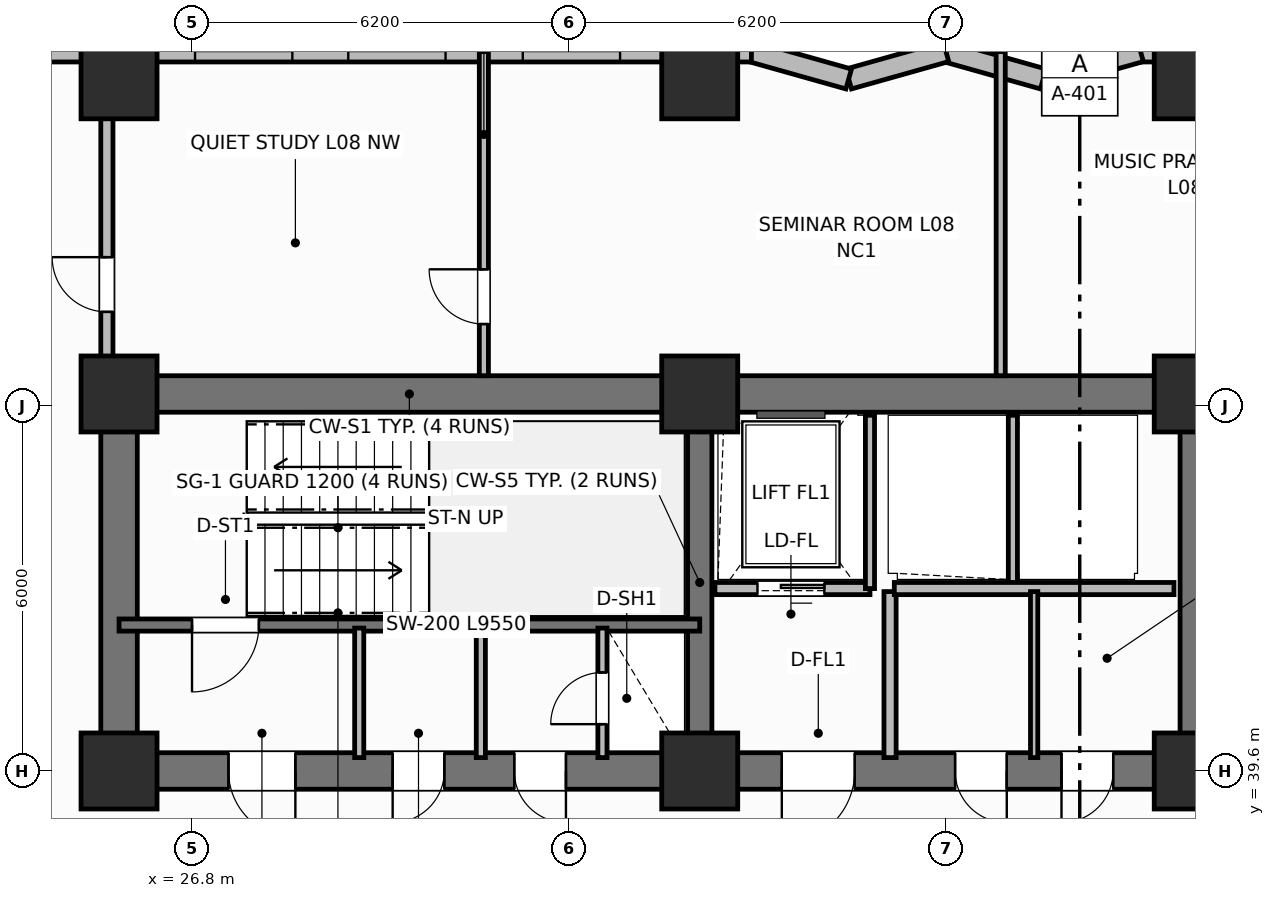
"""IFC4 building model, lengths in metres.
Left out: names, types, materials, properties, quantities, classifications, styles, units other than length and angle.
Written with IfcOpenShell. Run it as: python <this file> out.ifc"""

import sys

from ifc_helpers import new_model, si_unit, direction, frame, frame_2d, origin, origin_2d, place, context, subcontext, project, spatial, rectangle, extrude, element, fill, save


model = new_model("IFC4")
c1 = context("Model", 3, precision=1e-05, world=origin(), true_north=direction((0.0, 1.0)))
c2 = subcontext(c1, "Body", "Model", "MODEL_VIEW")
j1 = project(units=[si_unit("LENGTHUNIT", "METRE"), si_unit("PLANEANGLEUNIT", "RADIAN")], contexts=[c1])
p1 = place(None, origin())
s1 = spatial("IfcSite", under=j1, at=p1, CompositionType="ELEMENT")
p2 = place(p1, origin())
s2 = spatial("IfcBuilding", under=s1, at=p2, CompositionType="ELEMENT")
p3 = place(p2, frame((0.0, 0.0, 36.2)))
s3 = spatial("IfcBuildingStorey", under=s2, at=p3, CompositionType="ELEMENT", Elevation=36.2)
p4 = place(p3, frame((25.6, 45.8, 0.0), z_axis=(0.0, 0.0, 1.0), x_axis=(1.0, 0.0, 0.0)))
e1 = element("IfcWall", 1, at=p4, inside=s3, PredefinedType="SHEAR", context=c2, shape_type="SweptSolid", body=[
    extrude(rectangle(XDim=27.2, YDim=0.6, at=frame_2d((13.6, 0.0))), origin(), (0.0, 0.0, 1.0), 3.7),
])
p5 = place(p3, frame((25.6, 39.9, 0.0), z_axis=(0.0, 0.0, 1.0), x_axis=(0.0, 1.0, 0.0)))
e2 = element("IfcWall", 2, at=p5, inside=s3, PredefinedType="SHEAR", context=c2, shape_type="SweptSolid", body=[
    extrude(rectangle(XDim=5.6, YDim=0.6, at=frame_2d((2.8, 0.0))), origin(), (0.0, 0.0, 1.0), 3.7),
])
p6 = place(p3, frame((52.8, 39.6, 0.0), z_axis=(0.0, 0.0, 1.0), x_axis=(-1.0, 0.0, 0.0)))
e3 = element("IfcWall", 3, at=p6, inside=s3, PredefinedType="SHEAR", context=c2, shape_type="SweptSolid", body=[
    extrude(rectangle(XDim=27.2, YDim=0.6, at=frame_2d((13.6, 0.0))), origin(), (0.0, 0.0, 1.0), 3.7),
])
p7 = place(p6, frame((24.3, 0.0, 0.0)))
e4 = element("IfcOpeningElement", 4, at=p7, cuts=e3, PredefinedType="OPENING", context=c2, shape_type="SweptSolid", body=[
    extrude(rectangle(XDim=1.1, YDim=2.15, at=frame_2d((0.55, 1.075))), frame((0.0, 0.31, 0.0), z_axis=(0.0, -1.0, 0.0), x_axis=(1.0, 0.0, 0.0)), (0.0, 0.0, 1.0), 0.62),
])
p8 = place(p6, frame((21.85, 0.0, 0.0)))
e5 = element("IfcOpeningElement", 5, at=p8, cuts=e3, PredefinedType="OPENING", context=c2, shape_type="SweptSolid", body=[
    extrude(rectangle(XDim=0.85, YDim=2.1, at=frame_2d((0.425, 1.05))), frame((0.0, 0.31, 0.0), z_axis=(0.0, -1.0, 0.0), x_axis=(1.0, 0.0, 0.0)), (0.0, 0.0, 1.0), 0.62),
])
p9 = place(p6, frame((19.85, 0.0, 0.0)))
e6 = element("IfcOpeningElement", 6, at=p9, cuts=e3, PredefinedType="OPENING", context=c2, shape_type="SweptSolid", body=[
    extrude(rectangle(XDim=0.85, YDim=2.1, at=frame_2d((0.425, 1.05))), frame((0.0, 0.31, 0.0), z_axis=(0.0, -1.0, 0.0), x_axis=(1.0, 0.0, 0.0)), (0.0, 0.0, 1.0), 0.62),
])
p10 = place(p6, frame((15.1, 0.0, 0.0)))
e7 = element("IfcOpeningElement", 7, at=p10, cuts=e3, PredefinedType="OPENING", context=c2, shape_type="SweptSolid", body=[
    extrude(rectangle(XDim=1.2, YDim=2.15, at=frame_2d((0.6, 1.075))), frame((0.0, 0.31, 0.0), z_axis=(0.0, -1.0, 0.0), x_axis=(1.0, 0.0, 0.0)), (0.0, 0.0, 1.0), 0.62),
])
p11 = place(p6, frame((12.6, 0.0, 0.0)))
e8 = element("IfcOpeningElement", 8, at=p11, cuts=e3, PredefinedType="OPENING", context=c2, shape_type="SweptSolid", body=[
    extrude(rectangle(XDim=0.85, YDim=2.1, at=frame_2d((0.425, 1.05))), frame((0.0, 0.31, 0.0), z_axis=(0.0, -1.0, 0.0), x_axis=(1.0, 0.0, 0.0)), (0.0, 0.0, 1.0), 0.62),
])
p12 = place(p6, frame((10.85, 0.0, 0.0)))
e9 = element("IfcOpeningElement", 9, at=p12, cuts=e3, PredefinedType="OPENING", context=c2, shape_type="SweptSolid", body=[
    extrude(rectangle(XDim=0.85, YDim=2.1, at=frame_2d((0.425, 1.05))), frame((0.0, 0.31, 0.0), z_axis=(0.0, -1.0, 0.0), x_axis=(1.0, 0.0, 0.0)), (0.0, 0.0, 1.0), 0.62),
])
p13 = place(p6, frame((6.85, 0.0, 0.0)))
e10 = element("IfcOpeningElement", 10, at=p13, cuts=e3, PredefinedType="OPENING", context=c2, shape_type="SweptSolid", body=[
    extrude(rectangle(XDim=0.85, YDim=2.1, at=frame_2d((0.425, 1.05))), frame((0.0, 0.31, 0.0), z_axis=(0.0, -1.0, 0.0), x_axis=(1.0, 0.0, 0.0)), (0.0, 0.0, 1.0), 0.62),
])
p14 = place(p6, frame((2.0, 0.0, 0.0)))
e11 = element("IfcOpeningElement", 11, at=p14, cuts=e3, PredefinedType="OPENING", context=c2, shape_type="SweptSolid", body=[
    extrude(rectangle(XDim=0.85, YDim=2.1, at=frame_2d((0.425, 1.05))), frame((0.0, 0.31, 0.0), z_axis=(0.0, -1.0, 0.0), x_axis=(1.0, 0.0, 0.0)), (0.0, 0.0, 1.0), 0.62),
])
for number, where, z_axis, x_axis in (
    (12, (35.15, 39.9, 0.0), (0.0, 0.0, 1.0), (0.0, 1.0, 0.0)),
    (13, (43.25, 39.9, 0.0), (0.0, 0.0, 1.0), (0.0, 1.0, 0.0)),
):
    element("IfcWall", number, at=place(p3, frame(where, z_axis=z_axis, x_axis=x_axis)), inside=s3, PredefinedType="SHEAR", context=c2, shape_type="SweptSolid", body=[
        extrude(rectangle(XDim=5.6, YDim=0.4, at=frame_2d((2.8, 0.0))), origin(), (0.0, 0.0, 1.0), 3.7),
    ])
for number, where, z_axis, x_axis in (
    (14, (25.6, 39.6, 0.0), (0.0, 0.0, 1.0), (1.0, 0.0, 0.0)),
    (15, (25.6, 45.8, 0.0), (0.0, 0.0, 1.0), (1.0, 0.0, 0.0)),
    (16, (35.15, 39.6, 0.0), (0.0, 0.0, 1.0), (1.0, 0.0, 0.0)),
    (17, (35.15, 45.8, 0.0), (0.0, 0.0, 1.0), (1.0, 0.0, 0.0)),
    (18, (43.25, 39.6, 0.0), (0.0, 0.0, 1.0), (1.0, 0.0, 0.0)),
    (19, (43.25, 45.8, 0.0), (0.0, 0.0, 1.0), (1.0, 0.0, 0.0)),
    (20, (25.6, 50.95, 0.0), (0.0, 0.0, 1.0), (1.0, 0.0, 0.0)),
    (21, (35.15, 50.95, 0.0), (0.0, 0.0, 1.0), (1.0, 0.0, 0.0)),
    (22, (43.25, 50.95, 0.0), (0.0, 0.0, 1.0), (1.0, 0.0, 0.0)),
):
    element("IfcColumn", number, at=place(p3, frame(where, z_axis=z_axis, x_axis=x_axis)), inside=s3, PredefinedType="COLUMN", context=c2, shape_type="SweptSolid", body=[
        extrude(rectangle(XDim=1.25, YDim=1.25, at=origin_2d()), origin(), (0.0, 0.0, 1.0), 3.7),
    ])
p15 = place(p3, frame((59.8, 51.43, 0.0), z_axis=(0.0, 0.0, 1.0), x_axis=(-1.0, 0.0, 0.0)))
e23 = element("IfcWall", 23, at=p15, inside=s3, PredefinedType="SOLIDWALL", context=c2, shape_type="SweptSolid", body=[
    extrude(rectangle(XDim=17.4, YDim=0.34, at=frame_2d((8.7, 0.0))), origin(), (0.0, 0.0, 1.0), 2.7),
])
p16 = place(p15, frame((1.863, 0.0, 0.68)))
e24 = element("IfcOpeningElement", 24, at=p16, cuts=e23, PredefinedType="OPENING", context=c2, shape_type="SweptSolid", body=[
    extrude(rectangle(XDim=1.6, YDim=1.9, at=frame_2d((0.8, 0.95))), frame((0.0, 0.18, 0.0), z_axis=(0.0, -1.0, 0.0), x_axis=(1.0, 0.0, 0.0)), (0.0, 0.0, 1.0), 0.36),
])
p17 = place(p15, frame((9.913, 0.0, 0.68)))
e25 = element("IfcOpeningElement", 25, at=p17, cuts=e23, PredefinedType="OPENING", context=c2, shape_type="SweptSolid", body=[
    extrude(rectangle(XDim=1.6, YDim=1.9, at=frame_2d((0.8, 0.95))), frame((0.0, 0.18, 0.0), z_axis=(0.0, -1.0, 0.0), x_axis=(1.0, 0.0, 0.0)), (0.0, 0.0, 1.0), 0.36),
])
p18 = place(p15, frame((13.587, 0.0, 0.68)))
e26 = element("IfcOpeningElement", 26, at=p18, cuts=e23, PredefinedType="OPENING", context=c2, shape_type="SweptSolid", body=[
    extrude(rectangle(XDim=1.6, YDim=1.9, at=frame_2d((0.8, 0.95))), frame((0.0, 0.18, 0.0), z_axis=(0.0, -1.0, 0.0), x_axis=(1.0, 0.0, 0.0)), (0.0, 0.0, 1.0), 0.36),
])
p19 = place(p3, frame((42.4, 51.43, 0.0), z_axis=(0.0, 0.0, 1.0), x_axis=(-0.962652136636, -0.270741322725, 0.0)))
e27 = element("IfcWall", 27, at=p19, inside=s3, PredefinedType="SOLIDWALL", context=c2, shape_type="SweptSolid", body=[
    extrude(rectangle(XDim=1.662, YDim=0.34, at=frame_2d((0.831, 0.0))), origin(), (0.0, 0.0, 1.0), 2.7),
])
p20 = place(p3, frame((40.8, 50.98, 0.0), z_axis=(0.0, 0.0, 1.0), x_axis=(-0.962662902433, 0.270703040766, 0.0)))
e28 = element("IfcWall", 28, at=p20, inside=s3, PredefinedType="SOLIDWALL", context=c2, shape_type="SweptSolid", body=[
    extrude(rectangle(XDim=1.662, YDim=0.34, at=frame_2d((0.831, 0.0))), origin(), (0.0, 0.0, 1.0), 2.7),
])
p21 = place(p3, frame((39.2, 51.43, 0.0), z_axis=(0.0, 0.0, 1.0), x_axis=(-0.962652136636, -0.270741322725, 0.0)))
e29 = element("IfcWall", 29, at=p21, inside=s3, PredefinedType="SOLIDWALL", context=c2, shape_type="SweptSolid", body=[
    extrude(rectangle(XDim=1.662, YDim=0.34, at=frame_2d((0.831, 0.0))), origin(), (0.0, 0.0, 1.0), 2.7),
])
p22 = place(p3, frame((37.6, 50.98, 0.0), z_axis=(0.0, 0.0, 1.0), x_axis=(-0.962662902433, 0.270703040766, 0.0)))
e30 = element("IfcWall", 30, at=p22, inside=s3, PredefinedType="SOLIDWALL", context=c2, shape_type="SweptSolid", body=[
    extrude(rectangle(XDim=1.662, YDim=0.34, at=frame_2d((0.831, 0.0))), origin(), (0.0, 0.0, 1.0), 2.7),
])
p23 = place(p3, frame((36.0, 51.43, 0.0), z_axis=(0.0, 0.0, 1.0), x_axis=(-1.0, 0.0, 0.0)))
e31 = element("IfcWall", 31, at=p23, inside=s3, PredefinedType="SOLIDWALL", context=c2, shape_type="SweptSolid", body=[
    extrude(rectangle(XDim=17.4, YDim=0.34, at=frame_2d((8.7, 0.0))), origin(), (0.0, 0.0, 1.0), 2.7),
])
p24 = place(p23, frame((2.16, 0.0, 0.68)))
e32 = element("IfcOpeningElement", 32, at=p24, cuts=e31, PredefinedType="OPENING", context=c2, shape_type="SweptSolid", body=[
    extrude(rectangle(XDim=1.6, YDim=1.9, at=frame_2d((0.8, 0.95))), frame((0.0, 0.18, 0.0), z_axis=(0.0, -1.0, 0.0), x_axis=(1.0, 0.0, 0.0)), (0.0, 0.0, 1.0), 0.36),
])
p25 = place(p23, frame((5.03, 0.0, 0.68)))
e33 = element("IfcOpeningElement", 33, at=p25, cuts=e31, PredefinedType="OPENING", context=c2, shape_type="SweptSolid", body=[
    extrude(rectangle(XDim=1.6, YDim=1.9, at=frame_2d((0.8, 0.95))), frame((0.0, 0.18, 0.0), z_axis=(0.0, -1.0, 0.0), x_axis=(1.0, 0.0, 0.0)), (0.0, 0.0, 1.0), 0.36),
])
p26 = place(p23, frame((7.55, 0.0, 0.68)))
e34 = element("IfcOpeningElement", 34, at=p26, cuts=e31, PredefinedType="OPENING", context=c2, shape_type="SweptSolid", body=[
    extrude(rectangle(XDim=1.6, YDim=1.9, at=frame_2d((0.8, 0.95))), frame((0.0, 0.18, 0.0), z_axis=(0.0, -1.0, 0.0), x_axis=(1.0, 0.0, 0.0)), (0.0, 0.0, 1.0), 0.36),
])
p27 = place(p23, frame((14.34, 0.0, 0.68)))
e35 = element("IfcOpeningElement", 35, at=p27, cuts=e31, PredefinedType="OPENING", context=c2, shape_type="SweptSolid", body=[
    extrude(rectangle(XDim=1.6, YDim=1.9, at=frame_2d((0.8, 0.95))), frame((0.0, 0.18, 0.0), z_axis=(0.0, -1.0, 0.0), x_axis=(1.0, 0.0, 0.0)), (0.0, 0.0, 1.0), 0.36),
])
p28 = place(p3, frame((35.15, 42.0, 0.0), z_axis=(0.0, 0.0, 1.0), x_axis=(-1.0, 0.0, 0.0)))
e36 = element("IfcWall", 36, at=p28, inside=s3, PredefinedType="SHEAR", context=c2, shape_type="SweptSolid", body=[
    extrude(rectangle(XDim=9.55, YDim=0.2, at=frame_2d((4.775, 0.0))), origin(), (0.0, 0.0, 1.0), 3.7),
])
p29 = place(p28, frame((7.25, 0.0, 0.0)))
e37 = element("IfcOpeningElement", 37, at=p29, cuts=e36, PredefinedType="OPENING", context=c2, shape_type="SweptSolid", body=[
    extrude(rectangle(XDim=1.1, YDim=2.15, at=frame_2d((0.55, 1.075))), frame((0.0, 0.11, 0.0), z_axis=(0.0, -1.0, 0.0), x_axis=(1.0, 0.0, 0.0)), (0.0, 0.0, 1.0), 0.22),
])
p30 = place(p3, frame((33.55, 39.82, 0.0), z_axis=(0.0, 0.0, 1.0), x_axis=(0.0, 1.0, 0.0)))
e38 = element("IfcWall", 38, at=p30, inside=s3, PredefinedType="PARTITIONING", context=c2, shape_type="SweptSolid", body=[
    extrude(rectangle(XDim=2.13, YDim=0.15, at=frame_2d((1.065, 0.0))), origin(), (0.0, 0.0, 1.0), 2.53),
])
p31 = place(p30, frame((0.55, 0.0, 0.0)))
e39 = element("IfcOpeningElement", 39, at=p31, cuts=e38, PredefinedType="OPENING", context=c2, shape_type="SweptSolid", body=[
    extrude(rectangle(XDim=0.85, YDim=2.05, at=frame_2d((0.425, 1.025))), frame((0.0, 0.085, 0.0), z_axis=(0.0, -1.0, 0.0), x_axis=(1.0, 0.0, 0.0)), (0.0, 0.0, 1.0), 0.17),
])
for number, where, z_axis, x_axis in (
    (40, (29.55, 39.82, 0.0), (0.0, 0.0, 1.0), (0.0, 1.0, 0.0)),
    (41, (31.55, 39.82, 0.0), (0.0, 0.0, 1.0), (0.0, 1.0, 0.0)),
):
    element("IfcWall", number, at=place(p3, frame(where, z_axis=z_axis, x_axis=x_axis)), inside=s3, PredefinedType="PARTITIONING", context=c2, shape_type="SweptSolid", body=[
        extrude(rectangle(XDim=2.13, YDim=0.15, at=frame_2d((1.065, 0.0))), origin(), (0.0, 0.0, 1.0), 2.53),
    ])
p32 = place(p3, frame((37.95, 42.6, 0.0), z_axis=(0.0, 0.0, 1.0), x_axis=(-1.0, 0.0, 0.0)))
e42 = element("IfcWall", 42, at=p32, inside=s3, PredefinedType="PARTITIONING", context=c2, shape_type="SweptSolid", body=[
    extrude(rectangle(XDim=2.55, YDim=0.2, at=frame_2d((1.275, 0.0))), origin(), (0.0, 0.0, 1.0), 2.3),
])
p33 = place(p32, frame((0.75, 0.0, 0.0)))
e43 = element("IfcOpeningElement", 43, at=p33, cuts=e42, PredefinedType="OPENING", context=c2, shape_type="SweptSolid", body=[
    extrude(rectangle(XDim=1.1, YDim=2.15, at=frame_2d((0.55, 1.075))), frame((0.0, 0.11, 0.0), z_axis=(0.0, -1.0, 0.0), x_axis=(1.0, 0.0, 0.0)), (0.0, 0.0, 1.0), 0.22),
])
p34 = place(p3, frame((37.95, 42.6, 0.0), z_axis=(0.0, 0.0, 1.0), x_axis=(0.0, 1.0, 0.0)))
e44 = element("IfcWall", 44, at=p34, inside=s3, PredefinedType="PARTITIONING", context=c2, shape_type="SweptSolid", body=[
    extrude(rectangle(XDim=2.85, YDim=0.15, at=frame_2d((1.425, 0.0))), origin(), (0.0, 0.0, 1.0), 2.53),
])
p35 = place(p3, frame((38.28, 39.82, 0.0), z_axis=(0.0, 0.0, 1.0), x_axis=(0.0, 1.0, 0.0)))
e45 = element("IfcWall", 45, at=p35, inside=s3, PredefinedType="PARTITIONING", context=c2, shape_type="SweptSolid", body=[
    extrude(rectangle(XDim=2.73, YDim=0.2, at=frame_2d((1.365, 0.0))), origin(), (0.0, 0.0, 1.0), 2.53),
])
p36 = place(p3, frame((40.3, 42.65, 0.0), z_axis=(0.0, 0.0, 1.0), x_axis=(0.0, 1.0, 0.0)))
e46 = element("IfcWall", 46, at=p36, inside=s3, PredefinedType="PARTITIONING", context=c2, shape_type="SweptSolid", body=[
    extrude(rectangle(XDim=2.8, YDim=0.15, at=frame_2d((1.4, 0.0))), origin(), (0.0, 0.0, 1.0), 2.53),
])
p37 = place(p3, frame((42.95, 42.6, 0.0), z_axis=(0.0, 0.0, 1.0), x_axis=(-1.0, 0.0, 0.0)))
e47 = element("IfcWall", 47, at=p37, inside=s3, PredefinedType="PARTITIONING", context=c2, shape_type="SweptSolid", body=[
    extrude(rectangle(XDim=4.6, YDim=0.2, at=frame_2d((2.3, 0.0))), origin(), (0.0, 0.0, 1.0), 2.3),
])
p38 = place(p3, frame((40.65, 39.82, 0.0), z_axis=(0.0, 0.0, 1.0), x_axis=(0.0, 1.0, 0.0)))
e48 = element("IfcWall", 48, at=p38, inside=s3, PredefinedType="PARTITIONING", context=c2, shape_type="SweptSolid", body=[
    extrude(rectangle(XDim=2.73, YDim=0.12, at=frame_2d((1.365, 0.0))), origin(), (0.0, 0.0, 1.0), 2.53),
])
p39 = place(p3, frame((31.6, 46.1, 0.0), z_axis=(0.0, 0.0, 1.0), x_axis=(0.0, 1.0, 0.0)))
e49 = element("IfcWall", 49, at=p39, inside=s3, PredefinedType="PARTITIONING", context=c2, shape_type="SweptSolid", body=[
    extrude(rectangle(XDim=5.33, YDim=0.15, at=frame_2d((2.665, 0.0))), origin(), (0.0, 0.0, 1.0), 2.53),
])
p40 = place(p39, frame((0.85, 0.0, 0.0)))
e50 = element("IfcOpeningElement", 50, at=p40, cuts=e49, PredefinedType="OPENING", context=c2, shape_type="SweptSolid", body=[
    extrude(rectangle(XDim=0.9, YDim=2.1, at=frame_2d((0.45, 1.05))), frame((0.0, 0.085, 0.0), z_axis=(0.0, -1.0, 0.0), x_axis=(1.0, 0.0, 0.0)), (0.0, 0.0, 1.0), 0.17),
])
p41 = place(p3, frame((40.1, 46.1, 0.0), z_axis=(0.0, 0.0, 1.0), x_axis=(0.0, 1.0, 0.0)))
e51 = element("IfcWall", 51, at=p41, inside=s3, PredefinedType="PARTITIONING", context=c2, shape_type="SweptSolid", body=[
    extrude(rectangle(XDim=5.33, YDim=0.15, at=frame_2d((2.665, 0.0))), origin(), (0.0, 0.0, 1.0), 2.53),
])
p42 = place(p3, frame((25.4, 46.1, 0.0), z_axis=(0.0, 0.0, 1.0), x_axis=(0.0, 1.0, 0.0)))
e52 = element("IfcWall", 52, at=p42, inside=s3, PredefinedType="PARTITIONING", context=c2, shape_type="SweptSolid", body=[
    extrude(rectangle(XDim=4.38, YDim=0.2, at=frame_2d((2.19, 0.0))), origin(), (0.0, 0.0, 1.0), 2.53),
])
p43 = place(p42, frame((1.05, 0.0, 0.0)))
e53 = element("IfcOpeningElement", 53, at=p43, cuts=e52, PredefinedType="OPENING", context=c2, shape_type="SweptSolid", body=[
    extrude(rectangle(XDim=0.9, YDim=2.1, at=frame_2d((0.45, 1.05))), frame((0.0, 0.11, 0.0), z_axis=(0.0, -1.0, 0.0), x_axis=(1.0, 0.0, 0.0)), (0.0, 0.0, 1.0), 0.22),
])
p44 = place(p24, origin())
e54 = element("IfcWindow", 54, at=p44, inside=s3, PartitioningType="SINGLE_PANEL", PredefinedType="WINDOW", context=c2, shape_type="SweptSolid", body=[
    extrude(rectangle(XDim=1.6, YDim=1.9, at=frame_2d((0.8, 0.95))), frame((0.0, 0.03, 0.0), z_axis=(0.0, -1.0, 0.0), x_axis=(1.0, 0.0, 0.0)), (0.0, 0.0, 1.0), 0.06),
])
fill(e32, e54)
p45 = place(p25, origin())
e55 = element("IfcWindow", 55, at=p45, inside=s3, PartitioningType="SINGLE_PANEL", PredefinedType="WINDOW", context=c2, shape_type="SweptSolid", body=[
    extrude(rectangle(XDim=1.6, YDim=1.9, at=frame_2d((0.8, 0.95))), frame((0.0, 0.03, 0.0), z_axis=(0.0, -1.0, 0.0), x_axis=(1.0, 0.0, 0.0)), (0.0, 0.0, 1.0), 0.06),
])
fill(e33, e55)
p46 = place(p26, origin())
e56 = element("IfcWindow", 56, at=p46, inside=s3, PartitioningType="SINGLE_PANEL", PredefinedType="WINDOW", context=c2, shape_type="SweptSolid", body=[
    extrude(rectangle(XDim=1.6, YDim=1.9, at=frame_2d((0.8, 0.95))), frame((0.0, 0.03, 0.0), z_axis=(0.0, -1.0, 0.0), x_axis=(1.0, 0.0, 0.0)), (0.0, 0.0, 1.0), 0.06),
])
fill(e34, e56)
p47 = place(p29, origin())
e57 = element("IfcDoor", 57, at=p47, inside=s3, OperationType="SINGLE_SWING_RIGHT", PredefinedType="DOOR", context=c2, shape_type="SweptSolid", body=[
    extrude(rectangle(XDim=1.1, YDim=2.15, at=frame_2d((0.55, 1.075))), frame((0.0, 0.025, 0.0), z_axis=(0.0, -1.0, 0.0), x_axis=(1.0, 0.0, 0.0)), (0.0, 0.0, 1.0), 0.05),
])
fill(e37, e57)
p48 = place(p31, origin())
e58 = element("IfcDoor", 58, at=p48, inside=s3, OperationType="SINGLE_SWING_LEFT", PredefinedType="TRAPDOOR", context=c2, shape_type="SweptSolid", body=[
    extrude(rectangle(XDim=0.85, YDim=2.05, at=frame_2d((0.425, 1.025))), frame((0.0, 0.025, 0.0), z_axis=(0.0, -1.0, 0.0), x_axis=(1.0, 0.0, 0.0)), (0.0, 0.0, 1.0), 0.05),
])
fill(e39, e58)
p49 = place(p33, origin())
e59 = element("IfcDoor", 59, at=p49, inside=s3, OperationType="SLIDING_TO_LEFT", PredefinedType="DOOR", context=c2, shape_type="SweptSolid", body=[
    extrude(rectangle(XDim=1.1, YDim=2.15, at=frame_2d((0.55, 1.075))), frame((0.0, 0.025, 0.0), z_axis=(0.0, -1.0, 0.0), x_axis=(1.0, 0.0, 0.0)), (0.0, 0.0, 1.0), 0.05),
])
fill(e43, e59)
p50 = place(p40, origin())
e60 = element("IfcDoor", 60, at=p50, inside=s3, OperationType="SINGLE_SWING_RIGHT", PredefinedType="DOOR", context=c2, shape_type="SweptSolid", body=[
    extrude(rectangle(XDim=0.9, YDim=2.1, at=frame_2d((0.45, 1.05))), frame((0.0, 0.025, 0.0), z_axis=(0.0, -1.0, 0.0), x_axis=(1.0, 0.0, 0.0)), (0.0, 0.0, 1.0), 0.05),
])
fill(e50, e60)
p51 = place(p43, origin())
e61 = element("IfcDoor", 61, at=p51, inside=s3, OperationType="SINGLE_SWING_RIGHT", PredefinedType="DOOR", context=c2, shape_type="SweptSolid", body=[
    extrude(rectangle(XDim=0.9, YDim=2.1, at=frame_2d((0.45, 1.05))), frame((0.0, 0.025, 0.0), z_axis=(0.0, -1.0, 0.0), x_axis=(1.0, 0.0, 0.0)), (0.0, 0.0, 1.0), 0.05),
])
fill(e53, e61)
p52 = place(p7, origin())
e62 = element("IfcDoor", 62, at=p52, inside=s3, OperationType="SINGLE_SWING_LEFT", PredefinedType="DOOR", context=c2, shape_type="SweptSolid", body=[
    extrude(rectangle(XDim=1.1, YDim=2.15, at=frame_2d((0.55, 1.075))), frame((0.0, 0.025, 0.0), z_axis=(0.0, -1.0, 0.0), x_axis=(1.0, 0.0, 0.0)), (0.0, 0.0, 1.0), 0.05),
])
fill(e4, e62)
p53 = place(p8, origin())
e63 = element("IfcDoor", 63, at=p53, inside=s3, OperationType="SINGLE_SWING_RIGHT", PredefinedType="DOOR", context=c2, shape_type="SweptSolid", body=[
    extrude(rectangle(XDim=0.85, YDim=2.1, at=frame_2d((0.425, 1.05))), frame((0.0, 0.025, 0.0), z_axis=(0.0, -1.0, 0.0), x_axis=(1.0, 0.0, 0.0)), (0.0, 0.0, 1.0), 0.05),
])
fill(e5, e63)
p54 = place(p9, origin())
e64 = element("IfcDoor", 64, at=p54, inside=s3, OperationType="SINGLE_SWING_LEFT", PredefinedType="DOOR", context=c2, shape_type="SweptSolid", body=[
    extrude(rectangle(XDim=0.85, YDim=2.1, at=frame_2d((0.425, 1.05))), frame((0.0, 0.025, 0.0), z_axis=(0.0, -1.0, 0.0), x_axis=(1.0, 0.0, 0.0)), (0.0, 0.0, 1.0), 0.05),
])
fill(e6, e64)
p55 = place(p10, origin())
e65 = element("IfcDoor", 65, at=p55, inside=s3, OperationType="SINGLE_SWING_RIGHT", PredefinedType="DOOR", context=c2, shape_type="SweptSolid", body=[
    extrude(rectangle(XDim=1.2, YDim=2.15, at=frame_2d((0.6, 1.075))), frame((0.0, 0.025, 0.0), z_axis=(0.0, -1.0, 0.0), x_axis=(1.0, 0.0, 0.0)), (0.0, 0.0, 1.0), 0.05),
])
fill(e7, e65)
p56 = place(p11, origin())
e66 = element("IfcDoor", 66, at=p56, inside=s3, OperationType="SINGLE_SWING_LEFT", PredefinedType="DOOR", context=c2, shape_type="SweptSolid", body=[
    extrude(rectangle(XDim=0.85, YDim=2.1, at=frame_2d((0.425, 1.05))), frame((0.0, 0.025, 0.0), z_axis=(0.0, -1.0, 0.0), x_axis=(1.0, 0.0, 0.0)), (0.0, 0.0, 1.0), 0.05),
])
fill(e8, e66)
p57 = place(p12, origin())
e67 = element("IfcDoor", 67, at=p57, inside=s3, OperationType="SINGLE_SWING_RIGHT", PredefinedType="DOOR", context=c2, shape_type="SweptSolid", body=[
    extrude(rectangle(XDim=0.85, YDim=2.1, at=frame_2d((0.425, 1.05))), frame((0.0, 0.025, 0.0), z_axis=(0.0, -1.0, 0.0), x_axis=(1.0, 0.0, 0.0)), (0.0, 0.0, 1.0), 0.05),
])
fill(e9, e67)
save(model, sys.argv[1])
